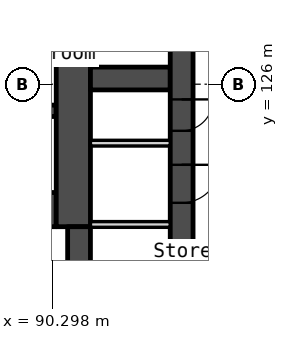
"""IFC4 building model, lengths in metres.
Left out: names, types, materials, properties, quantities, classifications, styles, units other than length and angle.
Written with IfcOpenShell. Run it as: python <this file> out.ifc"""

import sys

from ifc_helpers import new_model, si_unit, direction, frame, frame_2d, origin, place, context, subcontext, project, spatial, rectangle, extrude, element, fill, save


model = new_model("IFC4")
c1 = context("Model", 3, precision=1e-05, world=origin(), true_north=direction((0.0, 1.0)))
c2 = subcontext(c1, "Body", "Model", "MODEL_VIEW")
j1 = project(units=[si_unit("LENGTHUNIT", "METRE"), si_unit("PLANEANGLEUNIT", "RADIAN")], contexts=[c1])
p1 = place(None, origin())
s1 = spatial("IfcSite", under=j1, at=p1, CompositionType="ELEMENT")
p2 = place(p1, origin())
s2 = spatial("IfcBuilding", under=s1, at=p2, CompositionType="ELEMENT")
p3 = place(p2, frame((0.0, 0.0, 30.0)))
s3 = spatial("IfcBuildingStorey", under=s2, at=p3, CompositionType="ELEMENT", Elevation=30.0)
p4 = place(p3, frame((87.85, 125.3, 0.0), z_axis=(0.0, 0.0, 1.0), x_axis=(1.0, 0.0, 0.0)))
e1 = element("IfcWall", 1, at=p4, inside=s3, PredefinedType="SOLIDWALL", context=c2, shape_type="SweptSolid", body=[
    extrude(rectangle(XDim=2.55, YDim=0.3, at=frame_2d((1.275, 0.0))), origin(), (0.0, 0.0, 1.0), 4.8),
])
p5 = place(p3, frame((87.85, 122.7, 0.0), z_axis=(0.0, 0.0, 1.0), x_axis=(1.0, 0.0, 0.0)))
e2 = element("IfcWall", 2, at=p5, inside=s3, PredefinedType="SOLIDWALL", context=c2, shape_type="SweptSolid", body=[
    extrude(rectangle(XDim=2.55, YDim=0.9, at=frame_2d((1.275, 0.0))), origin(), (0.0, 0.0, 1.0), 4.8),
])
p6 = place(p3, frame((90.85, 133.95, 0.0), z_axis=(0.0, 0.0, 1.0), x_axis=(0.0, -1.0, 0.0)))
e3 = element("IfcWall", 3, at=p6, inside=s3, PredefinedType="SOLIDWALL", context=c2, shape_type="SweptSolid", body=[
    extrude(rectangle(XDim=11.7, YDim=0.9, at=frame_2d((5.85, 0.0))), origin(), (0.0, 0.0, 1.0), 4.8),
])
p7 = place(p3, frame((91.0, 122.25, 0.0), z_axis=(0.0, 0.0, 1.0), x_axis=(0.0, -1.0, 0.0)))
e4 = element("IfcWall", 4, at=p7, inside=s3, PredefinedType="SOLIDWALL", context=c2, shape_type="SweptSolid", body=[
    extrude(rectangle(XDim=2.1, YDim=0.6, at=frame_2d((1.05, 0.0))), origin(), (0.0, 0.0, 1.0), 4.8),
])
p8 = place(p3, frame((91.3, 126.15, 0.0), z_axis=(0.0, 0.0, 1.0), x_axis=(1.0, 0.0, 0.0)))
e5 = element("IfcWall", 5, at=p8, inside=s3, PredefinedType="SOLIDWALL", context=c2, shape_type="SweptSolid", body=[
    extrude(rectangle(XDim=2.1, YDim=0.6, at=frame_2d((1.05, 0.0))), origin(), (0.0, 0.0, 1.0), 4.8),
])
for number, where, z_axis, x_axis in (
    (6, (91.3, 124.449, 0.0), (0.0, 0.0, 1.0), (1.0, 0.0, 0.0)),
    (7, (91.3, 122.309, 0.0), (0.0, 0.0, 1.0), (1.0, 0.0, 0.0)),
):
    element("IfcWall", number, at=place(p3, frame(where, z_axis=z_axis, x_axis=x_axis)), inside=s3, PredefinedType="PARTITIONING", context=c2, shape_type="SweptSolid", body=[
        extrude(rectangle(XDim=2.1, YDim=0.15, at=frame_2d((1.05, 0.0))), origin(), (0.0, 0.0, 1.0), 4.8),
    ])
p9 = place(p3, frame((93.7, 133.95, 0.0), z_axis=(0.0, 0.0, 1.0), x_axis=(0.0, -1.0, 0.0)))
e8 = element("IfcWall", 8, at=p9, inside=s3, PredefinedType="SOLIDWALL", context=c2, shape_type="SweptSolid", body=[
    extrude(rectangle(XDim=13.8, YDim=0.6, at=frame_2d((6.9, 0.0))), origin(), (0.0, 0.0, 1.0), 4.8),
])
p10 = place(p9, frame((0.6, 0.0, 0.0)))
e9 = element("IfcOpeningElement", 9, at=p10, cuts=e8, PredefinedType="OPENING", context=c2, shape_type="SweptSolid", body=[
    extrude(rectangle(XDim=1.1, YDim=2.1, at=frame_2d((0.55, 1.05))), frame((0.0, 0.31, 0.0), z_axis=(0.0, -1.0, 0.0), x_axis=(1.0, 0.0, 0.0)), (0.0, 0.0, 1.0), 0.62),
])
p11 = place(p9, frame((8.35, 0.0, 0.0)))
e10 = element("IfcOpeningElement", 10, at=p11, cuts=e8, PredefinedType="OPENING", context=c2, shape_type="SweptSolid", body=[
    extrude(rectangle(XDim=0.826, YDim=2.1, at=frame_2d((0.413, 1.05))), frame((0.0, 0.31, 0.0), z_axis=(0.0, -1.0, 0.0), x_axis=(1.0, 0.0, 0.0)), (0.0, 0.0, 1.0), 0.62),
])
p12 = place(p9, frame((10.071, 0.0, 0.0)))
e11 = element("IfcOpeningElement", 11, at=p12, cuts=e8, PredefinedType="OPENING", context=c2, shape_type="SweptSolid", body=[
    extrude(rectangle(XDim=1.0, YDim=2.1, at=frame_2d((0.5, 1.05))), frame((0.0, 0.31, 0.0), z_axis=(0.0, -1.0, 0.0), x_axis=(1.0, 0.0, 0.0)), (0.0, 0.0, 1.0), 0.62),
])
p13 = place(p9, frame((12.258, 0.0, 0.0)))
e12 = element("IfcOpeningElement", 12, at=p13, cuts=e8, PredefinedType="OPENING", context=c2, shape_type="SweptSolid", body=[
    extrude(rectangle(XDim=1.0, YDim=2.1, at=frame_2d((0.5, 1.05))), frame((0.0, 0.31, 0.0), z_axis=(0.0, -1.0, 0.0), x_axis=(1.0, 0.0, 0.0)), (0.0, 0.0, 1.0), 0.62),
])
p14 = place(p3, frame((115.981, 129.091, 0.0), z_axis=(0.0, 0.0, 1.0), x_axis=(-0.500000858155, -0.866024908328, 0.0)))
e13 = element("IfcWall", 13, at=p14, inside=s3, PredefinedType="STANDARD", context=c2, shape_type="SweptSolid", body=[
    extrude(rectangle(XDim=66.294, YDim=1.0, at=frame_2d((33.147, 0.0))), origin(), (0.0, 0.0, 1.0), 0.6),
])
p15 = place(p11, origin())
e14 = element("IfcDoor", 14, at=p15, inside=s3, OperationType="SINGLE_SWING_LEFT", PredefinedType="DOOR", context=c2, shape_type="SweptSolid", body=[
    extrude(rectangle(XDim=0.826, YDim=2.1, at=frame_2d((0.413, 1.05))), frame((0.0, 0.025, 0.0), z_axis=(0.0, -1.0, 0.0), x_axis=(1.0, 0.0, 0.0)), (0.0, 0.0, 1.0), 0.05),
])
fill(e10, e14)
p16 = place(p12, origin())
e15 = element("IfcDoor", 15, at=p16, inside=s3, OperationType="SINGLE_SWING_LEFT", PredefinedType="DOOR", context=c2, shape_type="SweptSolid", body=[
    extrude(rectangle(XDim=1.0, YDim=2.1, at=frame_2d((0.5, 1.05))), frame((0.0, 0.025, 0.0), z_axis=(0.0, -1.0, 0.0), x_axis=(1.0, 0.0, 0.0)), (0.0, 0.0, 1.0), 0.05),
])
fill(e11, e15)
p17 = place(p13, origin())
e16 = element("IfcDoor", 16, at=p17, inside=s3, OperationType="SINGLE_SWING_LEFT", PredefinedType="DOOR", context=c2, shape_type="SweptSolid", body=[
    extrude(rectangle(XDim=1.0, YDim=2.1, at=frame_2d((0.5, 1.05))), frame((0.0, 0.025, 0.0), z_axis=(0.0, -1.0, 0.0), x_axis=(1.0, 0.0, 0.0)), (0.0, 0.0, 1.0), 0.05),
])
fill(e12, e16)
save(model, sys.argv[1])
